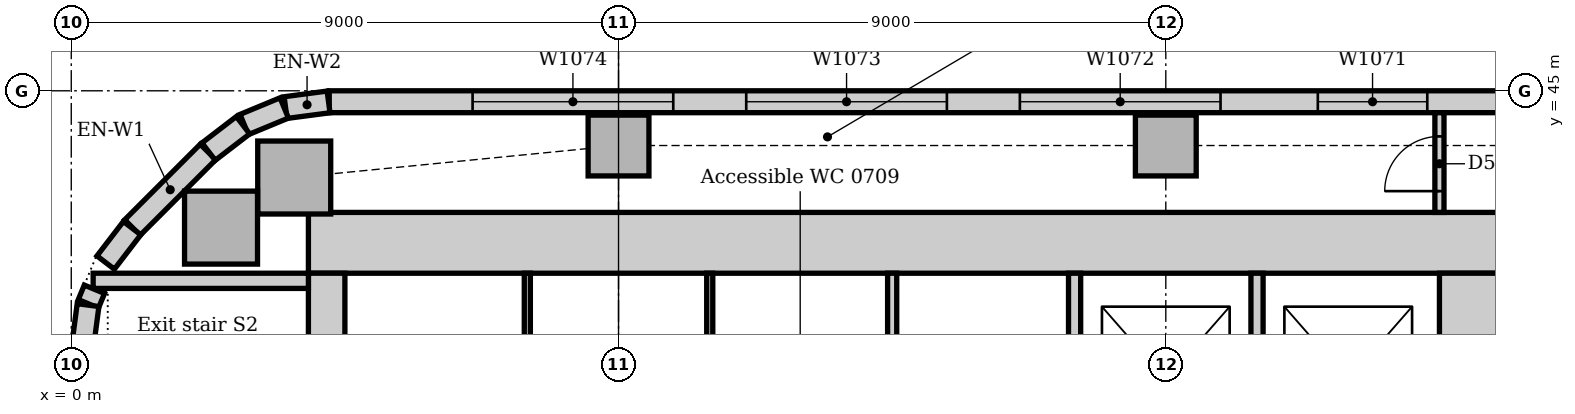
"""IFC4 building model, lengths in metres.
Left out: names, types, materials, properties, quantities, classifications, styles, units other than length and angle.
Written with IfcOpenShell. Run it as: python <this file> out.ifc"""

import sys

from ifc_helpers import new_model, si_unit, direction, frame, frame_2d, origin, origin_2d, place, context, subcontext, project, spatial, rectangle, extrude, element, fill, save


model = new_model("IFC4")
c1 = context("Model", 3, precision=1e-05, world=origin(), true_north=direction((0.0, 1.0)))
c2 = subcontext(c1, "Body", "Model", "MODEL_VIEW")
j1 = project(units=[si_unit("LENGTHUNIT", "METRE"), si_unit("PLANEANGLEUNIT", "RADIAN")], contexts=[c1])
p1 = place(None, origin())
s1 = spatial("IfcSite", under=j1, at=p1, CompositionType="ELEMENT")
p2 = place(p1, origin())
s2 = spatial("IfcBuilding", under=s1, at=p2, CompositionType="ELEMENT")
p3 = place(p2, frame((0.0, 0.0, 34.0)))
s3 = spatial("IfcBuildingStorey", under=s2, at=p3, CompositionType="ELEMENT", Elevation=34.0)
p4 = place(p3, frame((23.5, 42.5, 0.0), z_axis=(0.0, 0.0, 1.0), x_axis=(-1.0, 0.0, 0.0)))
e1 = element("IfcWall", 1, at=p4, inside=s3, PredefinedType="SOLIDWALL", context=c2, shape_type="SweptSolid", body=[
    extrude(rectangle(XDim=19.6, YDim=1.0, at=frame_2d((9.8, 0.0))), origin(), (0.0, 0.0, 1.0), 4.0),
])
p5 = place(p3, frame((23.0, 31.5, 0.0), z_axis=(0.0, 0.0, 1.0), x_axis=(0.0, 1.0, 0.0)))
e2 = element("IfcWall", 2, at=p5, inside=s3, PredefinedType="SOLIDWALL", context=c2, shape_type="SweptSolid", body=[
    extrude(rectangle(XDim=10.5, YDim=1.0, at=frame_2d((5.25, 0.0))), origin(), (0.0, 0.0, 1.0), 4.0),
])
p6 = place(p5, frame((3.15, 0.0, 0.0)))
e3 = element("IfcOpeningElement", 3, at=p6, cuts=e2, PredefinedType="OPENING", context=c2, shape_type="SweptSolid", body=[
    extrude(rectangle(XDim=1.0, YDim=2.1, at=frame_2d((0.5, 1.05))), frame((0.0, 0.51, 0.0), z_axis=(0.0, -1.0, 0.0), x_axis=(1.0, 0.0, 0.0)), (0.0, 0.0, 1.0), 1.02),
])
p7 = place(p5, frame((5.2, 0.0, 0.0)))
e4 = element("IfcOpeningElement", 4, at=p7, cuts=e2, PredefinedType="OPENING", context=c2, shape_type="SweptSolid", body=[
    extrude(rectangle(XDim=1.0, YDim=2.1, at=frame_2d((0.5, 1.05))), frame((0.0, 0.51, 0.0), z_axis=(0.0, -1.0, 0.0), x_axis=(1.0, 0.0, 0.0)), (0.0, 0.0, 1.0), 1.02),
])
p8 = place(p3, frame((4.2, 42.0, 0.0), z_axis=(0.0, 0.0, 1.0), x_axis=(0.0, -1.0, 0.0)))
e5 = element("IfcWall", 5, at=p8, inside=s3, PredefinedType="SOLIDWALL", context=c2, shape_type="SweptSolid", body=[
    extrude(rectangle(XDim=10.5, YDim=0.6, at=frame_2d((5.25, 0.0))), origin(), (0.0, 0.0, 1.0), 4.0),
])
p9 = place(p8, frame((5.3, 0.0, 0.0)))
e6 = element("IfcOpeningElement", 6, at=p9, cuts=e5, PredefinedType="OPENING", context=c2, shape_type="SweptSolid", body=[
    extrude(rectangle(XDim=1.0, YDim=2.1, at=frame_2d((0.5, 1.05))), frame((0.0, 0.31, 0.0), z_axis=(0.0, -1.0, 0.0), x_axis=(1.0, 0.0, 0.0)), (0.0, 0.0, 1.0), 0.62),
])
p10 = place(p3, frame((3.9, 41.875, 0.0), z_axis=(0.0, 0.0, 1.0), x_axis=(-1.0, 0.0, 0.0)))
e7 = element("IfcWall", 7, at=p10, inside=s3, PredefinedType="SOLIDWALL", context=c2, shape_type="SweptSolid", body=[
    extrude(rectangle(XDim=3.54, YDim=0.25, at=frame_2d((1.77, 0.0))), origin(), (0.0, 0.0, 1.0), 4.0),
])
for number, where, z_axis, x_axis in (
    (8, (3.667, 43.574, 0.0), (0.0, 0.0, 1.0), (1.0, 0.0, 0.0)),
    (9, (2.463, 42.75, 0.0), (0.0, 0.0, 1.0), (1.0, 0.0, 0.0)),
):
    element("IfcColumn", number, at=place(p3, frame(where, z_axis=z_axis, x_axis=x_axis)), inside=s3, PredefinedType="COLUMN", context=c2, shape_type="SweptSolid", body=[
        extrude(rectangle(XDim=1.2, YDim=1.2, at=origin_2d()), origin(), (0.0, 0.0, 1.0), 3.85),
    ])
for number, where, z_axis, x_axis in (
    (10, (9.0, 44.1, 0.0), (0.0, 0.0, 1.0), (1.0, 0.0, 0.0)),
    (11, (18.0, 44.1, 0.0), (0.0, 0.0, 1.0), (1.0, 0.0, 0.0)),
):
    element("IfcColumn", number, at=place(p3, frame(where, z_axis=z_axis, x_axis=x_axis)), inside=s3, PredefinedType="COLUMN", context=c2, shape_type="SweptSolid", body=[
        extrude(rectangle(XDim=1.0, YDim=1.0, at=origin_2d()), origin(), (0.0, 0.0, 1.0), 3.85),
    ])
p11 = place(p3, frame((48.257, 44.82, 0.0), z_axis=(0.0, 0.0, 1.0), x_axis=(-1.0, 0.0, 0.0)))
e12 = element("IfcWall", 12, at=p11, inside=s3, PredefinedType="STANDARD", context=c2, shape_type="SweptSolid", body=[
    extrude(rectangle(XDim=44.015, YDim=0.36, at=frame_2d((22.007, 0.0))), origin(), (0.0, 0.0, 1.0), 3.85),
])
p12 = place(p11, frame((2.057, 0.0, 0.9)))
e13 = element("IfcOpeningElement", 13, at=p12, cuts=e12, PredefinedType="OPENING", context=c2, shape_type="SweptSolid", body=[
    extrude(rectangle(XDim=3.3, YDim=1.6, at=frame_2d((1.65, 0.8))), frame((0.0, 0.19, 0.0), z_axis=(0.0, -1.0, 0.0), x_axis=(1.0, 0.0, 0.0)), (0.0, 0.0, 1.0), 0.38),
])
p13 = place(p11, frame((6.857, 0.0, 0.9)))
e14 = element("IfcOpeningElement", 14, at=p13, cuts=e12, PredefinedType="OPENING", context=c2, shape_type="SweptSolid", body=[
    extrude(rectangle(XDim=3.3, YDim=1.6, at=frame_2d((1.65, 0.8))), frame((0.0, 0.19, 0.0), z_axis=(0.0, -1.0, 0.0), x_axis=(1.0, 0.0, 0.0)), (0.0, 0.0, 1.0), 0.38),
])
p14 = place(p11, frame((11.357, 0.0, 0.9)))
e15 = element("IfcOpeningElement", 15, at=p14, cuts=e12, PredefinedType="OPENING", context=c2, shape_type="SweptSolid", body=[
    extrude(rectangle(XDim=3.3, YDim=1.6, at=frame_2d((1.65, 0.8))), frame((0.0, 0.19, 0.0), z_axis=(0.0, -1.0, 0.0), x_axis=(1.0, 0.0, 0.0)), (0.0, 0.0, 1.0), 0.38),
])
p15 = place(p11, frame((15.857, 0.0, 0.9)))
e16 = element("IfcOpeningElement", 16, at=p15, cuts=e12, PredefinedType="OPENING", context=c2, shape_type="SweptSolid", body=[
    extrude(rectangle(XDim=3.3, YDim=1.6, at=frame_2d((1.65, 0.8))), frame((0.0, 0.19, 0.0), z_axis=(0.0, -1.0, 0.0), x_axis=(1.0, 0.0, 0.0)), (0.0, 0.0, 1.0), 0.38),
])
p16 = place(p11, frame((20.357, 0.0, 0.9)))
e17 = element("IfcOpeningElement", 17, at=p16, cuts=e12, PredefinedType="OPENING", context=c2, shape_type="SweptSolid", body=[
    extrude(rectangle(XDim=3.3, YDim=1.6, at=frame_2d((1.65, 0.8))), frame((0.0, 0.19, 0.0), z_axis=(0.0, -1.0, 0.0), x_axis=(1.0, 0.0, 0.0)), (0.0, 0.0, 1.0), 0.38),
])
p17 = place(p11, frame((25.957, 0.0, 0.9)))
e18 = element("IfcOpeningElement", 18, at=p17, cuts=e12, PredefinedType="OPENING", context=c2, shape_type="SweptSolid", body=[
    extrude(rectangle(XDim=1.8, YDim=1.6, at=frame_2d((0.9, 0.8))), frame((0.0, 0.19, 0.0), z_axis=(0.0, -1.0, 0.0), x_axis=(1.0, 0.0, 0.0)), (0.0, 0.0, 1.0), 0.38),
])
p18 = place(p11, frame((29.357, 0.0, 0.9)))
e19 = element("IfcOpeningElement", 19, at=p18, cuts=e12, PredefinedType="OPENING", context=c2, shape_type="SweptSolid", body=[
    extrude(rectangle(XDim=3.3, YDim=1.6, at=frame_2d((1.65, 0.8))), frame((0.0, 0.19, 0.0), z_axis=(0.0, -1.0, 0.0), x_axis=(1.0, 0.0, 0.0)), (0.0, 0.0, 1.0), 0.38),
])
p19 = place(p11, frame((33.857, 0.0, 0.9)))
e20 = element("IfcOpeningElement", 20, at=p19, cuts=e12, PredefinedType="OPENING", context=c2, shape_type="SweptSolid", body=[
    extrude(rectangle(XDim=3.3, YDim=1.6, at=frame_2d((1.65, 0.8))), frame((0.0, 0.19, 0.0), z_axis=(0.0, -1.0, 0.0), x_axis=(1.0, 0.0, 0.0)), (0.0, 0.0, 1.0), 0.38),
])
p20 = place(p11, frame((38.357, 0.0, 0.9)))
e21 = element("IfcOpeningElement", 21, at=p20, cuts=e12, PredefinedType="OPENING", context=c2, shape_type="SweptSolid", body=[
    extrude(rectangle(XDim=3.3, YDim=1.6, at=frame_2d((1.65, 0.8))), frame((0.0, 0.19, 0.0), z_axis=(0.0, -1.0, 0.0), x_axis=(1.0, 0.0, 0.0)), (0.0, 0.0, 1.0), 0.38),
])
p21 = place(p3, frame((2.249, 43.994, 0.0), z_axis=(0.0, 0.0, 1.0), x_axis=(-0.707106781187, -0.707106781187, 0.0)))
e22 = element("IfcWall", 22, at=p21, inside=s3, PredefinedType="STANDARD", context=c2, shape_type="SweptSolid", body=[
    extrude(rectangle(XDim=1.757, YDim=0.36, at=frame_2d((0.879, 0.0))), origin(), (0.0, 0.0, 1.0), 3.85),
])
for number, where, z_axis, x_axis in (
    (23, (4.231, 44.817, 0.0), (0.0, 0.0, 1.0), (-0.991, -0.131, 0.0)),
    (24, (3.503, 44.718, 0.0), (0.0, 0.0, 1.0), (-0.924, -0.383, 0.0)),
):
    element("IfcWall", number, at=place(p3, frame(where, z_axis=z_axis, x_axis=x_axis)), inside=s3, PredefinedType="STANDARD", context=c2, shape_type="SweptSolid", body=[
        extrude(rectangle(XDim=0.713, YDim=0.36, at=frame_2d((0.356, 0.0))), origin(), (0.0, 0.0, 1.0), 3.85),
    ])
for number, where, z_axis, x_axis in (
    (25, (2.825, 44.434, 0.0), (0.0, 0.0, 1.0), (-0.793, -0.609, 0.0)),
    (26, (1.0, 42.741, 0.0), (0.0, 0.0, 1.0), (-0.609, -0.793, 0.0)),
):
    element("IfcWall", number, at=place(p3, frame(where, z_axis=z_axis, x_axis=x_axis)), inside=s3, PredefinedType="STANDARD", context=c2, shape_type="SweptSolid", body=[
        extrude(rectangle(XDim=0.713, YDim=0.36, at=frame_2d((0.357, 0.0))), origin(), (0.0, 0.0, 1.0), 3.85),
    ])
p22 = place(p3, frame((0.381, 41.736, 0.0), z_axis=(0.0, 0.0, 1.0), x_axis=(-0.382773360986, -0.923842277729, 0.0)))
e27 = element("IfcWall", 27, at=p22, inside=s3, PredefinedType="STANDARD", context=c2, shape_type="SweptSolid", body=[
    extrude(rectangle(XDim=0.258, YDim=0.36, at=frame_2d((0.129, 0.0))), origin(), (0.0, 0.0, 1.0), 3.85),
])
p23 = place(p3, frame((0.276, 41.476, 0.0), z_axis=(0.0, 0.0, 1.0), x_axis=(-0.13055608231, -0.99144092581, 0.0)))
e28 = element("IfcWall", 28, at=p23, inside=s3, PredefinedType="STANDARD", context=c2, shape_type="SweptSolid", body=[
    extrude(rectangle(XDim=0.713, YDim=0.36, at=frame_2d((0.356, 0.0))), origin(), (0.0, 0.0, 1.0), 3.85),
])
for number, where, z_axis, x_axis in (
    (29, (16.5, 38.6, 0.0), (0.0, 0.0, 1.0), (0.0, 1.0, 0.0)),
    (30, (19.5, 38.6, 0.0), (0.0, 0.0, 1.0), (0.0, 1.0, 0.0)),
):
    element("IfcWall", number, at=place(p3, frame(where, z_axis=z_axis, x_axis=x_axis)), inside=s3, PredefinedType="PARTITIONING", context=c2, shape_type="SweptSolid", body=[
        extrude(rectangle(XDim=3.4, YDim=0.2, at=frame_2d((1.7, 0.0))), origin(), (0.0, 0.0, 1.0), 3.85),
    ])
p24 = place(p3, frame((22.5, 43.0, 0.0), z_axis=(0.0, 0.0, 1.0), x_axis=(0.0, 1.0, 0.0)))
e31 = element("IfcWall", 31, at=p24, inside=s3, PredefinedType="PARTITIONING", context=c2, shape_type="SweptSolid", body=[
    extrude(rectangle(XDim=1.64, YDim=0.15, at=frame_2d((0.82, 0.0))), origin(), (0.0, 0.0, 1.0), 3.85),
])
p25 = place(p24, frame((0.35, 0.0, 0.0)))
e32 = element("IfcOpeningElement", 32, at=p25, cuts=e31, PredefinedType="OPENING", context=c2, shape_type="SweptSolid", body=[
    extrude(rectangle(XDim=0.9, YDim=2.1, at=frame_2d((0.45, 1.05))), frame((0.0, 0.085, 0.0), z_axis=(0.0, -1.0, 0.0), x_axis=(1.0, 0.0, 0.0)), (0.0, 0.0, 1.0), 0.17),
])
p26 = place(p3, frame((13.5, 38.575, 0.0), z_axis=(0.0, 0.0, 1.0), x_axis=(0.0, 1.0, 0.0)))
e33 = element("IfcWall", 33, at=p26, inside=s3, PredefinedType="PARTITIONING", context=c2, shape_type="SweptSolid", body=[
    extrude(rectangle(XDim=3.425, YDim=0.15, at=frame_2d((1.712, 0.0))), origin(), (0.0, 0.0, 1.0), 3.85),
])
for number, where, z_axis, x_axis in (
    (34, (7.5, 38.575, 0.0), (0.0, 0.0, 1.0), (0.0, 1.0, 0.0)),
    (35, (10.5, 38.575, 0.0), (0.0, 0.0, 1.0), (0.0, 1.0, 0.0)),
):
    element("IfcWall", number, at=place(p3, frame(where, z_axis=z_axis, x_axis=x_axis)), inside=s3, PredefinedType="PARTITIONING", context=c2, shape_type="SweptSolid", body=[
        extrude(rectangle(XDim=3.425, YDim=0.1, at=frame_2d((1.712, 0.0))), origin(), (0.0, 0.0, 1.0), 3.85),
    ])
p27 = place(p17, origin())
e36 = element("IfcWindow", 36, at=p27, inside=s3, PartitioningType="SINGLE_PANEL", PredefinedType="WINDOW", context=c2, shape_type="SweptSolid", body=[
    extrude(rectangle(XDim=1.8, YDim=1.6, at=frame_2d((0.9, 0.8))), frame((0.0, 0.13, 0.0), z_axis=(0.0, -1.0, 0.0), x_axis=(1.0, 0.0, 0.0)), (0.0, 0.0, 1.0), 0.06),
])
fill(e18, e36)
p28 = place(p18, origin())
e37 = element("IfcWindow", 37, at=p28, inside=s3, PartitioningType="SINGLE_PANEL", PredefinedType="WINDOW", context=c2, shape_type="SweptSolid", body=[
    extrude(rectangle(XDim=3.3, YDim=1.6, at=frame_2d((1.65, 0.8))), frame((0.0, 0.13, 0.0), z_axis=(0.0, -1.0, 0.0), x_axis=(1.0, 0.0, 0.0)), (0.0, 0.0, 1.0), 0.06),
])
fill(e19, e37)
p29 = place(p19, origin())
e38 = element("IfcWindow", 38, at=p29, inside=s3, PartitioningType="SINGLE_PANEL", PredefinedType="WINDOW", context=c2, shape_type="SweptSolid", body=[
    extrude(rectangle(XDim=3.3, YDim=1.6, at=frame_2d((1.65, 0.8))), frame((0.0, 0.13, 0.0), z_axis=(0.0, -1.0, 0.0), x_axis=(1.0, 0.0, 0.0)), (0.0, 0.0, 1.0), 0.06),
])
fill(e20, e38)
p30 = place(p20, origin())
e39 = element("IfcWindow", 39, at=p30, inside=s3, PartitioningType="SINGLE_PANEL", PredefinedType="WINDOW", context=c2, shape_type="SweptSolid", body=[
    extrude(rectangle(XDim=3.3, YDim=1.6, at=frame_2d((1.65, 0.8))), frame((0.0, 0.13, 0.0), z_axis=(0.0, -1.0, 0.0), x_axis=(1.0, 0.0, 0.0)), (0.0, 0.0, 1.0), 0.06),
])
fill(e21, e39)
p31 = place(p25, origin())
e40 = element("IfcDoor", 40, at=p31, inside=s3, OperationType="SINGLE_SWING_LEFT", PredefinedType="DOOR", context=c2, shape_type="SweptSolid", body=[
    extrude(rectangle(XDim=0.9, YDim=2.1, at=frame_2d((0.45, 1.05))), frame((0.0, 0.025, 0.0), z_axis=(0.0, -1.0, 0.0), x_axis=(1.0, 0.0, 0.0)), (0.0, 0.0, 1.0), 0.05),
])
fill(e32, e40)
save(model, sys.argv[1])
